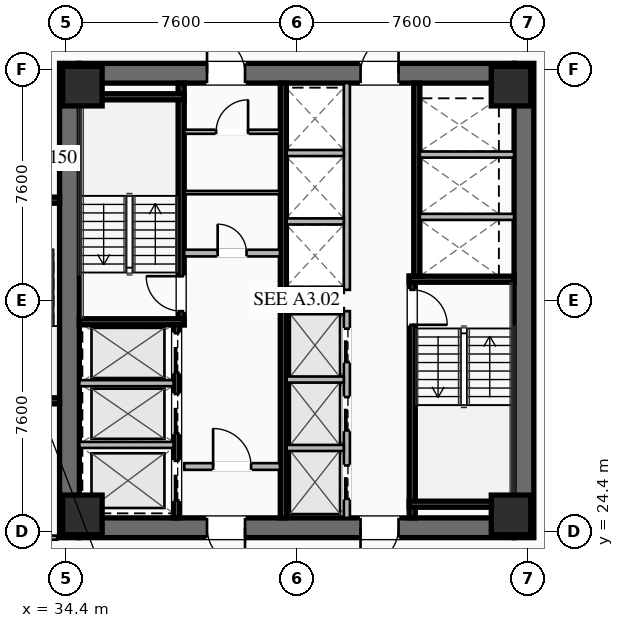
"""IFC4 building model, lengths in metres.
Left out: names, types, materials, properties, quantities, classifications, styles, units other than length and angle.
Written with IfcOpenShell. Run it as: python <this file> out.ifc"""

import sys

from ifc_helpers import new_model, si_unit, direction, frame, frame_2d, origin, origin_2d, place, context, subcontext, project, spatial, rectangle, hollow_rectangle, extrude, element, fill, save


model = new_model("IFC4")
c1 = context("Model", 3, precision=1e-05, world=origin(), true_north=direction((0.0, 1.0)))
c2 = subcontext(c1, "Body", "Model", "MODEL_VIEW")
j1 = project(units=[si_unit("LENGTHUNIT", "METRE"), si_unit("PLANEANGLEUNIT", "RADIAN")], contexts=[c1])
p1 = place(None, origin())
s1 = spatial("IfcSite", under=j1, at=p1, CompositionType="ELEMENT")
p2 = place(p1, origin())
s2 = spatial("IfcBuilding", under=s1, at=p2, CompositionType="ELEMENT")
p3 = place(p2, frame((0.0, 0.0, 99.15)))
s3 = spatial("IfcBuildingStorey", under=s2, at=p3, CompositionType="ELEMENT", Elevation=99.15)
for number, where, z_axis, x_axis in (
    (1, (34.525, 24.2, 0.0), (0.0, 0.0, 1.0), (0.0, 1.0, 0.0)),
    (2, (49.475, 39.8, 0.0), (0.0, 0.0, 1.0), (0.0, -1.0, 0.0)),
):
    element("IfcWall", number, at=place(p3, frame(where, z_axis=z_axis, x_axis=x_axis)), inside=s3, PredefinedType="SHEAR", context=c2, shape_type="SweptSolid", body=[
        extrude(rectangle(XDim=15.6, YDim=0.65, at=frame_2d((7.8, 0.0))), origin(), (0.0, 0.0, 1.0), 3.55),
    ])
p4 = place(p3, frame((49.15, 24.525, 0.0), z_axis=(0.0, 0.0, 1.0), x_axis=(-1.0, 0.0, 0.0)))
e3 = element("IfcWall", 3, at=p4, inside=s3, PredefinedType="SHEAR", context=c2, shape_type="SweptSolid", body=[
    extrude(rectangle(XDim=14.3, YDim=0.65, at=frame_2d((7.15, 0.0))), origin(), (0.0, 0.0, 1.0), 3.55),
])
p5 = place(p4, frame((8.85, 0.0, 0.0)))
e4 = element("IfcOpeningElement", 4, at=p5, cuts=e3, PredefinedType="OPENING", context=c2, shape_type="SweptSolid", body=[
    extrude(rectangle(XDim=1.25, YDim=2.25, at=frame_2d((0.625, 1.125))), frame((0.0, 0.335, 0.0), z_axis=(0.0, -1.0, 0.0), x_axis=(1.0, 0.0, 0.0)), (0.0, 0.0, 1.0), 0.67),
])
p6 = place(p4, frame((3.8, 0.0, 0.0)))
e5 = element("IfcOpeningElement", 5, at=p6, cuts=e3, PredefinedType="OPENING", context=c2, shape_type="SweptSolid", body=[
    extrude(rectangle(XDim=1.25, YDim=2.25, at=frame_2d((0.625, 1.125))), frame((0.0, 0.335, 0.0), z_axis=(0.0, -1.0, 0.0), x_axis=(1.0, 0.0, 0.0)), (0.0, 0.0, 1.0), 0.67),
])
p7 = place(p3, frame((34.85, 39.475, 0.0), z_axis=(0.0, 0.0, 1.0), x_axis=(1.0, 0.0, 0.0)))
e6 = element("IfcWall", 6, at=p7, inside=s3, PredefinedType="SHEAR", context=c2, shape_type="SweptSolid", body=[
    extrude(rectangle(XDim=14.3, YDim=0.65, at=frame_2d((7.15, 0.0))), origin(), (0.0, 0.0, 1.0), 3.55),
])
p8 = place(p7, frame((4.2, 0.0, 0.0)))
e7 = element("IfcOpeningElement", 7, at=p8, cuts=e6, PredefinedType="OPENING", context=c2, shape_type="SweptSolid", body=[
    extrude(rectangle(XDim=1.25, YDim=2.25, at=frame_2d((0.625, 1.125))), frame((0.0, 0.335, 0.0), z_axis=(0.0, -1.0, 0.0), x_axis=(1.0, 0.0, 0.0)), (0.0, 0.0, 1.0), 0.67),
])
p9 = place(p7, frame((9.25, 0.0, 0.0)))
e8 = element("IfcOpeningElement", 8, at=p9, cuts=e6, PredefinedType="OPENING", context=c2, shape_type="SweptSolid", body=[
    extrude(rectangle(XDim=1.25, YDim=2.25, at=frame_2d((0.625, 1.125))), frame((0.0, 0.335, 0.0), z_axis=(0.0, -1.0, 0.0), x_axis=(1.0, 0.0, 0.0)), (0.0, 0.0, 1.0), 0.67),
])
for number, where, z_axis, x_axis in (
    (9, (34.95, 24.95, 0.0), (0.0, 0.0, 1.0), (1.0, 0.0, 0.0)),
    (10, (49.05, 24.95, 0.0), (0.0, 0.0, 1.0), (1.0, 0.0, 0.0)),
    (11, (49.05, 39.05, 0.0), (0.0, 0.0, 1.0), (1.0, 0.0, 0.0)),
    (12, (34.95, 39.05, 0.0), (0.0, 0.0, 1.0), (1.0, 0.0, 0.0)),
):
    element("IfcColumn", number, at=place(p3, frame(where, z_axis=z_axis, x_axis=x_axis)), inside=s3, PredefinedType="COLUMN", context=c2, shape_type="SweptSolid", body=[
        extrude(hollow_rectangle(XDim=1.3, YDim=1.3, WallThickness=0.05, at=origin_2d()), origin(), (0.0, 0.0, 1.0), 3.35),
    ])
p10 = place(p3, frame((38.2, 31.2, 0.0), z_axis=(0.0, 0.0, 1.0), x_axis=(0.0, 1.0, 0.0)))
e13 = element("IfcWall", 13, at=p10, inside=s3, PredefinedType="SHEAR", context=c2, shape_type="SweptSolid", body=[
    extrude(rectangle(XDim=7.95, YDim=0.2, at=frame_2d((3.975, 0.0))), origin(), (0.0, 0.0, 1.0), 3.35),
])
p11 = place(p10, frame((0.45, 0.0, 0.0)))
e14 = element("IfcOpeningElement", 14, at=p11, cuts=e13, PredefinedType="OPENING", context=c2, shape_type="SweptSolid", body=[
    extrude(rectangle(XDim=1.15, YDim=2.2, at=frame_2d((0.575, 1.1))), frame((0.0, 0.11, 0.0), z_axis=(0.0, -1.0, 0.0), x_axis=(1.0, 0.0, 0.0)), (0.0, 0.0, 1.0), 0.22),
])
for number, where, z_axis, x_axis in (
    (15, (34.85, 31.3, 0.0), (0.0, 0.0, 1.0), (1.0, 0.0, 0.0)),
    (16, (34.85, 38.7, 0.0), (0.0, 0.0, 1.0), (1.0, 0.0, 0.0)),
):
    element("IfcWall", number, at=place(p3, frame(where, z_axis=z_axis, x_axis=x_axis)), inside=s3, PredefinedType="SHEAR", context=c2, shape_type="SweptSolid", body=[
        extrude(rectangle(XDim=3.45, YDim=0.2, at=frame_2d((1.725, 0.0))), origin(), (0.0, 0.0, 1.0), 3.35),
    ])
p12 = place(p3, frame((45.8, 32.8, 0.0), z_axis=(0.0, 0.0, 1.0), x_axis=(0.0, -1.0, 0.0)))
e17 = element("IfcWall", 17, at=p12, inside=s3, PredefinedType="SHEAR", context=c2, shape_type="SweptSolid", body=[
    extrude(rectangle(XDim=7.95, YDim=0.2, at=frame_2d((3.975, 0.0))), origin(), (0.0, 0.0, 1.0), 3.35),
])
p13 = place(p12, frame((0.45, 0.0, 0.0)))
e18 = element("IfcOpeningElement", 18, at=p13, cuts=e17, PredefinedType="OPENING", context=c2, shape_type="SweptSolid", body=[
    extrude(rectangle(XDim=1.15, YDim=2.2, at=frame_2d((0.575, 1.1))), frame((0.0, 0.11, 0.0), z_axis=(0.0, -1.0, 0.0), x_axis=(1.0, 0.0, 0.0)), (0.0, 0.0, 1.0), 0.22),
])
for number, where, z_axis, x_axis in (
    (19, (45.7, 32.7, 0.0), (0.0, 0.0, 1.0), (1.0, 0.0, 0.0)),
    (20, (45.7, 25.3, 0.0), (0.0, 0.0, 1.0), (1.0, 0.0, 0.0)),
):
    element("IfcWall", number, at=place(p3, frame(where, z_axis=z_axis, x_axis=x_axis)), inside=s3, PredefinedType="SHEAR", context=c2, shape_type="SweptSolid", body=[
        extrude(rectangle(XDim=3.45, YDim=0.2, at=frame_2d((1.725, 0.0))), origin(), (0.0, 0.0, 1.0), 3.35),
    ])
p14 = place(p3, frame((41.56, 24.85, 0.0), z_axis=(0.0, 0.0, 1.0), x_axis=(0.0, 1.0, 0.0)))
e21 = element("IfcWall", 21, at=p14, inside=s3, PredefinedType="SHEAR", context=c2, shape_type="SweptSolid", body=[
    extrude(rectangle(XDim=14.3, YDim=0.2, at=frame_2d((7.15, 0.0))), origin(), (0.0, 0.0, 1.0), 3.35),
])
p15 = place(p3, frame((38.3, 33.56, 0.0), z_axis=(0.0, 0.0, 1.0), x_axis=(1.0, 0.0, 0.0)))
e22 = element("IfcWall", 22, at=p15, inside=s3, PredefinedType="SOLIDWALL", context=c2, shape_type="SweptSolid", body=[
    extrude(rectangle(XDim=3.15, YDim=0.22, at=frame_2d((1.575, 0.0))), origin(), (0.0, 0.0, 1.0), 2.703),
])
p16 = place(p15, frame((1.1, 0.0, 0.0)))
e23 = element("IfcOpeningElement", 23, at=p16, cuts=e22, PredefinedType="OPENING", context=c2, shape_type="SweptSolid", body=[
    extrude(rectangle(XDim=0.95, YDim=2.05, at=frame_2d((0.475, 1.025))), frame((0.0, 0.12, 0.0), z_axis=(0.0, -1.0, 0.0), x_axis=(1.0, 0.0, 0.0)), (0.0, 0.0, 1.0), 0.24),
])
p17 = place(p3, frame((38.3, 26.54, 0.0), z_axis=(0.0, 0.0, 1.0), x_axis=(1.0, 0.0, 0.0)))
e24 = element("IfcWall", 24, at=p17, inside=s3, PredefinedType="SOLIDWALL", context=c2, shape_type="SweptSolid", body=[
    extrude(rectangle(XDim=3.15, YDim=0.22, at=frame_2d((1.575, 0.0))), origin(), (0.0, 0.0, 1.0), 2.703),
])
p18 = place(p17, frame((0.95, 0.0, 0.0)))
e25 = element("IfcOpeningElement", 25, at=p18, cuts=e24, PredefinedType="OPENING", context=c2, shape_type="SweptSolid", body=[
    extrude(rectangle(XDim=1.25, YDim=2.25, at=frame_2d((0.625, 1.125))), frame((0.0, 0.12, 0.0), z_axis=(0.0, -1.0, 0.0), x_axis=(1.0, 0.0, 0.0)), (0.0, 0.0, 1.0), 0.24),
])
p19 = place(p3, frame((38.05, 24.85, 0.0), z_axis=(0.0, 0.0, 1.0), x_axis=(0.0, 1.0, 0.0)))
e26 = element("IfcWall", 26, at=p19, inside=s3, PredefinedType="SHEAR", context=c2, shape_type="SweptSolid", body=[
    extrude(rectangle(XDim=6.35, YDim=0.2, at=frame_2d((3.175, 0.0))), origin(), (0.0, 0.0, 1.0), 3.35),
])
p20 = place(p19, frame((4.775, 0.0, 0.0)))
e27 = element("IfcOpeningElement", 27, at=p20, cuts=e26, PredefinedType="OPENING", context=c2, shape_type="SweptSolid", body=[
    extrude(rectangle(XDim=1.3, YDim=2.25, at=frame_2d((0.65, 1.125))), frame((0.0, 0.11, 0.0), z_axis=(0.0, -1.0, 0.0), x_axis=(1.0, 0.0, 0.0)), (0.0, 0.0, 1.0), 0.22),
])
p21 = place(p19, frame((2.775, 0.0, 0.0)))
e28 = element("IfcOpeningElement", 28, at=p21, cuts=e26, PredefinedType="OPENING", context=c2, shape_type="SweptSolid", body=[
    extrude(rectangle(XDim=1.3, YDim=2.25, at=frame_2d((0.65, 1.125))), frame((0.0, 0.11, 0.0), z_axis=(0.0, -1.0, 0.0), x_axis=(1.0, 0.0, 0.0)), (0.0, 0.0, 1.0), 0.22),
])
p22 = place(p19, frame((0.575, 0.0, 0.0)))
e29 = element("IfcOpeningElement", 29, at=p22, cuts=e26, PredefinedType="OPENING", context=c2, shape_type="SweptSolid", body=[
    extrude(rectangle(XDim=1.3, YDim=2.25, at=frame_2d((0.65, 1.125))), frame((0.0, 0.11, 0.0), z_axis=(0.0, -1.0, 0.0), x_axis=(1.0, 0.0, 0.0)), (0.0, 0.0, 1.0), 0.22),
])
for number, where, z_axis, x_axis in (
    (30, (34.85, 27.25, 0.0), (0.0, 0.0, 1.0), (1.0, 0.0, 0.0)),
    (31, (34.85, 29.28, 0.0), (0.0, 0.0, 1.0), (1.0, 0.0, 0.0)),
):
    element("IfcWall", number, at=place(p3, frame(where, z_axis=z_axis, x_axis=x_axis)), inside=s3, PredefinedType="SOLIDWALL", context=c2, shape_type="SweptSolid", body=[
        extrude(rectangle(XDim=3.1, YDim=0.2, at=frame_2d((1.55, 0.0))), origin(), (0.0, 0.0, 1.0), 3.35),
    ])
p23 = place(p3, frame((45.95, 39.15, 0.0), z_axis=(0.0, 0.0, 1.0), x_axis=(0.0, -1.0, 0.0)))
e32 = element("IfcWall", 32, at=p23, inside=s3, PredefinedType="SHEAR", context=c2, shape_type="SweptSolid", body=[
    extrude(rectangle(XDim=6.35, YDim=0.2, at=frame_2d((3.175, 0.0))), origin(), (0.0, 0.0, 1.0), 3.35),
])
for number, where, z_axis, x_axis in (
    (33, (46.05, 34.75, 0.0), (0.0, 0.0, 1.0), (1.0, 0.0, 0.0)),
    (34, (46.05, 36.8, 0.0), (0.0, 0.0, 1.0), (1.0, 0.0, 0.0)),
):
    element("IfcWall", number, at=place(p3, frame(where, z_axis=z_axis, x_axis=x_axis)), inside=s3, PredefinedType="SOLIDWALL", context=c2, shape_type="SweptSolid", body=[
        extrude(rectangle(XDim=3.1, YDim=0.2, at=frame_2d((1.55, 0.0))), origin(), (0.0, 0.0, 1.0), 3.35),
    ])
p24 = place(p3, frame((38.3, 37.55, 0.0), z_axis=(0.0, 0.0, 1.0), x_axis=(1.0, 0.0, 0.0)))
e35 = element("IfcWall", 35, at=p24, inside=s3, PredefinedType="PARTITIONING", context=c2, shape_type="SweptSolid", body=[
    extrude(rectangle(XDim=3.15, YDim=0.135, at=frame_2d((1.575, 0.0))), origin(), (0.0, 0.0, 1.0), 2.703),
])
p25 = place(p24, frame((1.05, 0.0, 0.0)))
e36 = element("IfcOpeningElement", 36, at=p25, cuts=e35, PredefinedType="OPENING", context=c2, shape_type="SweptSolid", body=[
    extrude(rectangle(XDim=1.05, YDim=2.2, at=frame_2d((0.525, 1.1))), frame((0.0, 0.077, 0.0), z_axis=(0.0, -1.0, 0.0), x_axis=(1.0, 0.0, 0.0)), (0.0, 0.0, 1.0), 0.155),
])
p26 = place(p3, frame((38.3, 35.55, 0.0), z_axis=(0.0, 0.0, 1.0), x_axis=(1.0, 0.0, 0.0)))
e37 = element("IfcWall", 37, at=p26, inside=s3, PredefinedType="PARTITIONING", context=c2, shape_type="SweptSolid", body=[
    extrude(rectangle(XDim=3.15, YDim=0.11, at=frame_2d((1.575, 0.0))), origin(), (0.0, 0.0, 1.0), 2.703),
])
p27 = place(p3, frame((43.65, 24.85, 0.0), z_axis=(0.0, 0.0, 1.0), x_axis=(0.0, 1.0, 0.0)))
e38 = element("IfcWall", 38, at=p27, inside=s3, PredefinedType="SOLIDWALL", context=c2, shape_type="SweptSolid", body=[
    extrude(rectangle(XDim=6.8, YDim=0.2, at=frame_2d((3.4, 0.0))), origin(), (0.0, 0.0, 1.0), 3.35),
])
p28 = place(p27, frame((0.625, 0.0, 0.0)))
e39 = element("IfcOpeningElement", 39, at=p28, cuts=e38, PredefinedType="OPENING", context=c2, shape_type="SweptSolid", body=[
    extrude(rectangle(XDim=1.1, YDim=2.2, at=frame_2d((0.55, 1.1))), frame((0.0, 0.11, 0.0), z_axis=(0.0, -1.0, 0.0), x_axis=(1.0, 0.0, 0.0)), (0.0, 0.0, 1.0), 0.22),
])
p29 = place(p27, frame((2.875, 0.0, 0.0)))
e40 = element("IfcOpeningElement", 40, at=p29, cuts=e38, PredefinedType="OPENING", context=c2, shape_type="SweptSolid", body=[
    extrude(rectangle(XDim=1.1, YDim=2.2, at=frame_2d((0.55, 1.1))), frame((0.0, 0.11, 0.0), z_axis=(0.0, -1.0, 0.0), x_axis=(1.0, 0.0, 0.0)), (0.0, 0.0, 1.0), 0.22),
])
p30 = place(p27, frame((5.125, 0.0, 0.0)))
e41 = element("IfcOpeningElement", 41, at=p30, cuts=e38, PredefinedType="OPENING", context=c2, shape_type="SweptSolid", body=[
    extrude(rectangle(XDim=1.1, YDim=2.2, at=frame_2d((0.55, 1.1))), frame((0.0, 0.11, 0.0), z_axis=(0.0, -1.0, 0.0), x_axis=(1.0, 0.0, 0.0)), (0.0, 0.0, 1.0), 0.22),
])
for number, where, z_axis, x_axis in (
    (42, (41.67, 27.15, 0.0), (0.0, 0.0, 1.0), (1.0, 0.0, 0.0)),
    (43, (41.67, 29.4, 0.0), (0.0, 0.0, 1.0), (1.0, 0.0, 0.0)),
    (44, (41.67, 31.65, 0.0), (0.0, 0.0, 1.0), (1.0, 0.0, 0.0)),
):
    element("IfcWall", number, at=place(p3, frame(where, z_axis=z_axis, x_axis=x_axis)), inside=s3, PredefinedType="SOLIDWALL", context=c2, shape_type="SweptSolid", body=[
        extrude(rectangle(XDim=1.88, YDim=0.2, at=frame_2d((0.94, 0.0))), origin(), (0.0, 0.0, 1.0), 3.35),
    ])
p31 = place(p3, frame((43.65, 32.35, 0.0), z_axis=(0.0, 0.0, 1.0), x_axis=(0.0, 1.0, 0.0)))
e45 = element("IfcWall", 45, at=p31, inside=s3, PredefinedType="SOLIDWALL", context=c2, shape_type="SweptSolid", body=[
    extrude(rectangle(XDim=6.8, YDim=0.2, at=frame_2d((3.4, 0.0))), origin(), (0.0, 0.0, 1.0), 3.35),
])
for number, where, z_axis, x_axis in (
    (46, (41.67, 32.35, 0.0), (0.0, 0.0, 1.0), (1.0, 0.0, 0.0)),
    (47, (41.67, 34.6, 0.0), (0.0, 0.0, 1.0), (1.0, 0.0, 0.0)),
    (48, (41.67, 36.85, 0.0), (0.0, 0.0, 1.0), (1.0, 0.0, 0.0)),
):
    element("IfcWall", number, at=place(p3, frame(where, z_axis=z_axis, x_axis=x_axis)), inside=s3, PredefinedType="SOLIDWALL", context=c2, shape_type="SweptSolid", body=[
        extrude(rectangle(XDim=1.88, YDim=0.2, at=frame_2d((0.94, 0.0))), origin(), (0.0, 0.0, 1.0), 3.35),
    ])
p32 = place(p3, frame((34.2, 35.3, 0.0), z_axis=(0.0, 0.0, 1.0), x_axis=(-1.0, 0.0, 0.0)))
e49 = element("IfcWall", 49, at=p32, inside=s3, PredefinedType="SHEAR", context=c2, shape_type="SweptSolid", body=[
    extrude(rectangle(XDim=3.4, YDim=0.2, at=frame_2d((1.7, 0.0))), origin(), (0.0, 0.0, 1.0), 3.35),
])
p33 = place(p32, frame((0.275, 0.0, 0.0)))
e50 = element("IfcOpeningElement", 50, at=p33, cuts=e49, PredefinedType="OPENING", context=c2, shape_type="SweptSolid", body=[
    extrude(rectangle(XDim=1.15, YDim=2.2, at=frame_2d((0.575, 1.1))), frame((0.0, 0.11, 0.0), z_axis=(0.0, -1.0, 0.0), x_axis=(1.0, 0.0, 0.0)), (0.0, 0.0, 1.0), 0.22),
])
p34 = place(p3, frame((30.8, 28.7, 0.0), z_axis=(0.0, 0.0, 1.0), x_axis=(1.0, 0.0, 0.0)))
e51 = element("IfcWall", 51, at=p34, inside=s3, PredefinedType="SHEAR", context=c2, shape_type="SweptSolid", body=[
    extrude(rectangle(XDim=3.4, YDim=0.2, at=frame_2d((1.7, 0.0))), origin(), (0.0, 0.0, 1.0), 3.35),
])
p35 = place(p3, frame((21.02, 24.2, 0.0), z_axis=(0.0, 0.0, 1.0), x_axis=(1.0, 0.0, 0.0)))
e52 = element("IfcWall", 52, at=p35, inside=s3, PredefinedType="PARTITIONING", context=c2, shape_type="SweptSolid", body=[
    extrude(rectangle(XDim=13.1, YDim=0.135, at=frame_2d((6.55, 0.0))), origin(), (0.0, 0.0, 1.0), 2.703),
])
p36 = place(p35, frame((10.105, 0.0, 0.0)))
e53 = element("IfcOpeningElement", 53, at=p36, cuts=e52, PredefinedType="OPENING", context=c2, shape_type="SweptSolid", body=[
    extrude(rectangle(XDim=0.95, YDim=2.05, at=frame_2d((0.475, 1.025))), frame((0.0, 0.077, 0.0), z_axis=(0.0, -1.0, 0.0), x_axis=(1.0, 0.0, 0.0)), (0.0, 0.0, 1.0), 0.155),
])
p37 = place(p8, origin())
e54 = element("IfcDoor", 54, at=p37, inside=s3, OperationType="SINGLE_SWING_LEFT", PredefinedType="DOOR", context=c2, shape_type="SweptSolid", body=[
    extrude(rectangle(XDim=1.25, YDim=2.25, at=frame_2d((0.625, 1.125))), frame((0.0, 0.025, 0.0), z_axis=(0.0, -1.0, 0.0), x_axis=(1.0, 0.0, 0.0)), (0.0, 0.0, 1.0), 0.05),
])
fill(e7, e54)
p38 = place(p9, origin())
e55 = element("IfcDoor", 55, at=p38, inside=s3, OperationType="SINGLE_SWING_RIGHT", PredefinedType="DOOR", context=c2, shape_type="SweptSolid", body=[
    extrude(rectangle(XDim=1.25, YDim=2.25, at=frame_2d((0.625, 1.125))), frame((0.0, 0.025, 0.0), z_axis=(0.0, -1.0, 0.0), x_axis=(1.0, 0.0, 0.0)), (0.0, 0.0, 1.0), 0.05),
])
fill(e8, e55)
p39 = place(p5, origin())
e56 = element("IfcDoor", 56, at=p39, inside=s3, OperationType="SINGLE_SWING_LEFT", PredefinedType="DOOR", context=c2, shape_type="SweptSolid", body=[
    extrude(rectangle(XDim=1.25, YDim=2.25, at=frame_2d((0.625, 1.125))), frame((0.0, 0.025, 0.0), z_axis=(0.0, -1.0, 0.0), x_axis=(1.0, 0.0, 0.0)), (0.0, 0.0, 1.0), 0.05),
])
fill(e4, e56)
p40 = place(p6, origin())
e57 = element("IfcDoor", 57, at=p40, inside=s3, OperationType="SINGLE_SWING_RIGHT", PredefinedType="DOOR", context=c2, shape_type="SweptSolid", body=[
    extrude(rectangle(XDim=1.25, YDim=2.25, at=frame_2d((0.625, 1.125))), frame((0.0, 0.025, 0.0), z_axis=(0.0, -1.0, 0.0), x_axis=(1.0, 0.0, 0.0)), (0.0, 0.0, 1.0), 0.05),
])
fill(e5, e57)
p41 = place(p11, origin())
e58 = element("IfcDoor", 58, at=p41, inside=s3, OperationType="SINGLE_SWING_RIGHT", PredefinedType="DOOR", context=c2, shape_type="SweptSolid", body=[
    extrude(rectangle(XDim=1.15, YDim=2.2, at=frame_2d((0.575, 1.1))), frame((0.0, 0.025, 0.0), z_axis=(0.0, -1.0, 0.0), x_axis=(1.0, 0.0, 0.0)), (0.0, 0.0, 1.0), 0.05),
])
fill(e14, e58)
p42 = place(p13, origin())
e59 = element("IfcDoor", 59, at=p42, inside=s3, OperationType="SINGLE_SWING_RIGHT", PredefinedType="DOOR", context=c2, shape_type="SweptSolid", body=[
    extrude(rectangle(XDim=1.15, YDim=2.2, at=frame_2d((0.575, 1.1))), frame((0.0, 0.025, 0.0), z_axis=(0.0, -1.0, 0.0), x_axis=(1.0, 0.0, 0.0)), (0.0, 0.0, 1.0), 0.05),
])
fill(e18, e59)
p43 = place(p18, origin())
e60 = element("IfcDoor", 60, at=p43, inside=s3, OperationType="SINGLE_SWING_LEFT", PredefinedType="DOOR", context=c2, shape_type="SweptSolid", body=[
    extrude(rectangle(XDim=1.25, YDim=2.25, at=frame_2d((0.625, 1.125))), frame((0.0, 0.025, 0.0), z_axis=(0.0, -1.0, 0.0), x_axis=(1.0, 0.0, 0.0)), (0.0, 0.0, 1.0), 0.05),
])
fill(e25, e60)
p44 = place(p25, origin())
e61 = element("IfcDoor", 61, at=p44, inside=s3, OperationType="SINGLE_SWING_RIGHT", PredefinedType="DOOR", context=c2, shape_type="SweptSolid", body=[
    extrude(rectangle(XDim=1.05, YDim=2.2, at=frame_2d((0.525, 1.1))), frame((0.0, 0.025, 0.0), z_axis=(0.0, -1.0, 0.0), x_axis=(1.0, 0.0, 0.0)), (0.0, 0.0, 1.0), 0.05),
])
fill(e36, e61)
p45 = place(p16, origin())
e62 = element("IfcDoor", 62, at=p45, inside=s3, OperationType="SINGLE_SWING_LEFT", PredefinedType="DOOR", context=c2, shape_type="SweptSolid", body=[
    extrude(rectangle(XDim=0.95, YDim=2.05, at=frame_2d((0.475, 1.025))), frame((0.0, 0.025, 0.0), z_axis=(0.0, -1.0, 0.0), x_axis=(1.0, 0.0, 0.0)), (0.0, 0.0, 1.0), 0.05),
])
fill(e23, e62)
p46 = place(p20, origin())
e63 = element("IfcDoor", 63, at=p46, inside=s3, OperationType="SLIDING_TO_LEFT", PredefinedType="DOOR", context=c2, shape_type="SweptSolid", body=[
    extrude(rectangle(XDim=1.3, YDim=2.25, at=frame_2d((0.65, 1.125))), frame((0.0, 0.025, 0.0), z_axis=(0.0, -1.0, 0.0), x_axis=(1.0, 0.0, 0.0)), (0.0, 0.0, 1.0), 0.05),
])
fill(e27, e63)
p47 = place(p21, origin())
e64 = element("IfcDoor", 64, at=p47, inside=s3, OperationType="SLIDING_TO_LEFT", PredefinedType="DOOR", context=c2, shape_type="SweptSolid", body=[
    extrude(rectangle(XDim=1.3, YDim=2.25, at=frame_2d((0.65, 1.125))), frame((0.0, 0.025, 0.0), z_axis=(0.0, -1.0, 0.0), x_axis=(1.0, 0.0, 0.0)), (0.0, 0.0, 1.0), 0.05),
])
fill(e28, e64)
p48 = place(p22, origin())
e65 = element("IfcDoor", 65, at=p48, inside=s3, OperationType="SLIDING_TO_LEFT", PredefinedType="DOOR", context=c2, shape_type="SweptSolid", body=[
    extrude(rectangle(XDim=1.3, YDim=2.25, at=frame_2d((0.65, 1.125))), frame((0.0, 0.025, 0.0), z_axis=(0.0, -1.0, 0.0), x_axis=(1.0, 0.0, 0.0)), (0.0, 0.0, 1.0), 0.05),
])
fill(e29, e65)
p49 = place(p28, origin())
e66 = element("IfcDoor", 66, at=p49, inside=s3, OperationType="SLIDING_TO_LEFT", PredefinedType="DOOR", context=c2, shape_type="SweptSolid", body=[
    extrude(rectangle(XDim=1.1, YDim=2.2, at=frame_2d((0.55, 1.1))), frame((0.0, 0.025, 0.0), z_axis=(0.0, -1.0, 0.0), x_axis=(1.0, 0.0, 0.0)), (0.0, 0.0, 1.0), 0.05),
])
fill(e39, e66)
p50 = place(p29, origin())
e67 = element("IfcDoor", 67, at=p50, inside=s3, OperationType="SLIDING_TO_LEFT", PredefinedType="DOOR", context=c2, shape_type="SweptSolid", body=[
    extrude(rectangle(XDim=1.1, YDim=2.2, at=frame_2d((0.55, 1.1))), frame((0.0, 0.025, 0.0), z_axis=(0.0, -1.0, 0.0), x_axis=(1.0, 0.0, 0.0)), (0.0, 0.0, 1.0), 0.05),
])
fill(e40, e67)
p51 = place(p30, origin())
e68 = element("IfcDoor", 68, at=p51, inside=s3, OperationType="SLIDING_TO_LEFT", PredefinedType="DOOR", context=c2, shape_type="SweptSolid", body=[
    extrude(rectangle(XDim=1.1, YDim=2.2, at=frame_2d((0.55, 1.1))), frame((0.0, 0.025, 0.0), z_axis=(0.0, -1.0, 0.0), x_axis=(1.0, 0.0, 0.0)), (0.0, 0.0, 1.0), 0.05),
])
fill(e41, e68)
save(model, sys.argv[1])
